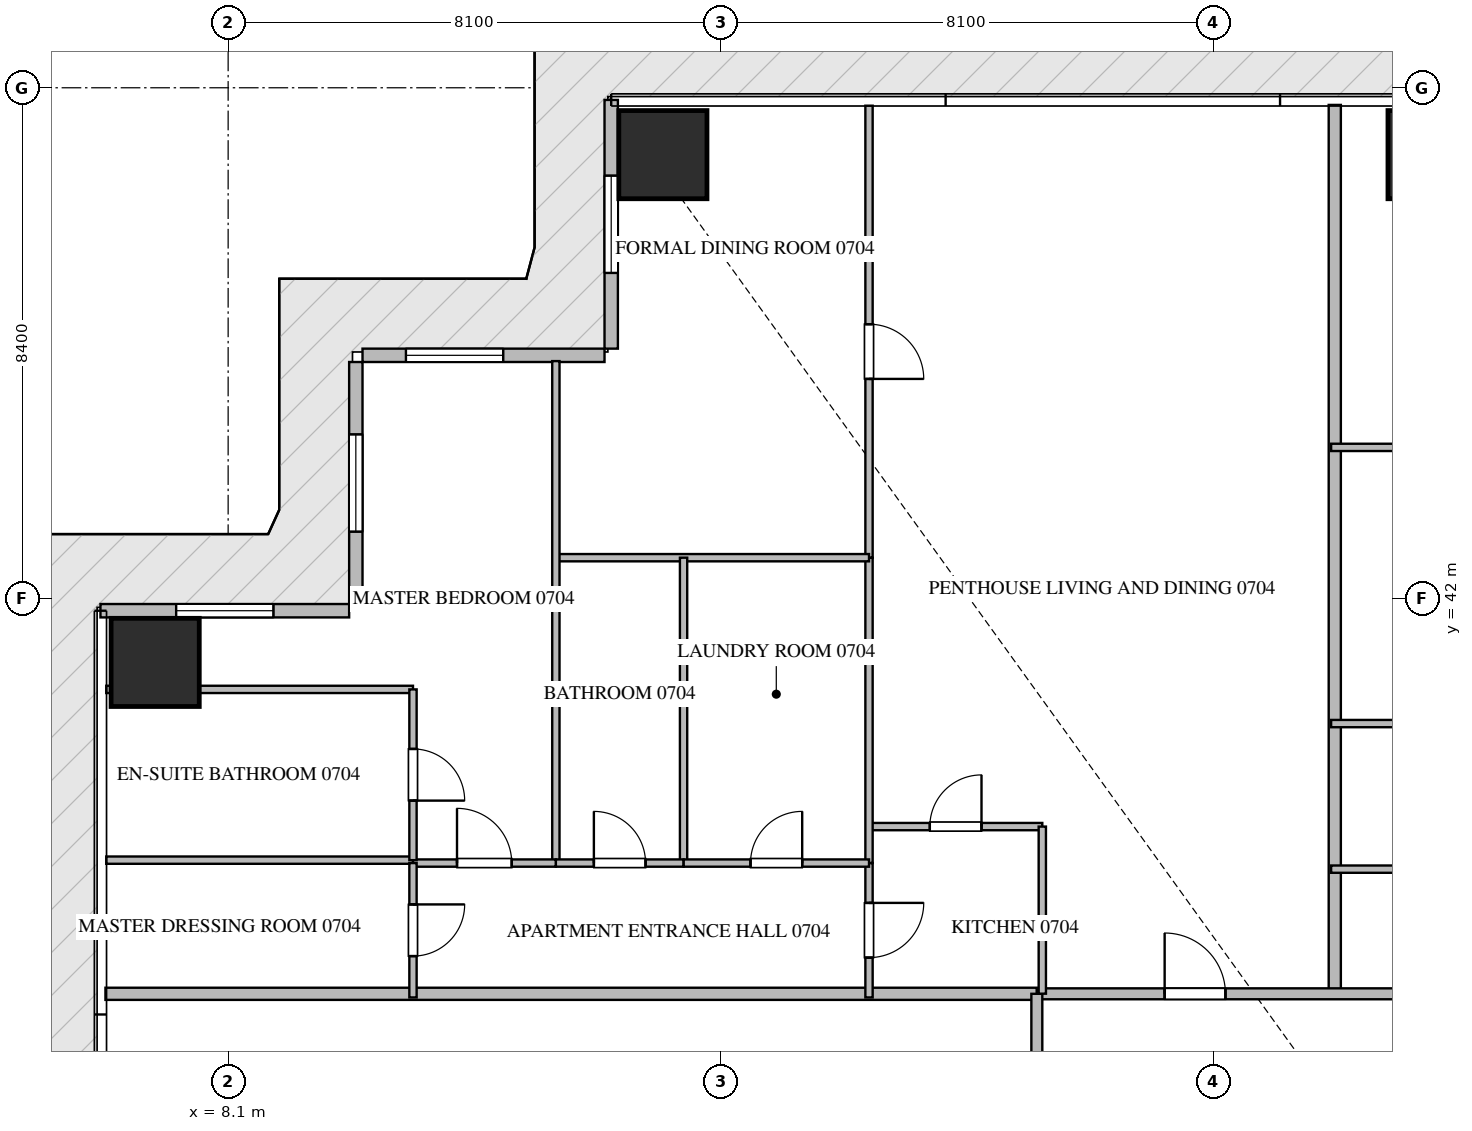
"""IFC4 building model, lengths in metres.
Left out: names, types, materials, properties, quantities, classifications, styles, units other than length and angle.
Written with IfcOpenShell. Run it as: python <this file> out.ifc"""

import sys

from ifc_helpers import new_model, si_unit, direction, frame, frame_2d, origin, origin_2d, place, context, subcontext, project, spatial, rectangle, extrude, source, transform, mapped, element, fill, save


model = new_model("IFC4")
c1 = context("Model", 3, precision=1e-05, world=origin(), true_north=direction((0.0, 1.0)))
c2 = subcontext(c1, "Body", "Model", "MODEL_VIEW")
j1 = project(units=[si_unit("LENGTHUNIT", "METRE"), si_unit("PLANEANGLEUNIT", "RADIAN")], contexts=[c1])
p1 = place(None, origin())
s1 = spatial("IfcSite", under=j1, at=p1, CompositionType="ELEMENT")
p2 = place(p1, origin())
s2 = spatial("IfcBuilding", under=s1, at=p2, CompositionType="ELEMENT")
p3 = place(p2, frame((0.0, 0.0, 34.2)))
s3 = spatial("IfcBuildingStorey", under=s2, at=p3, CompositionType="ELEMENT", Elevation=34.2)
m1 = source(origin(), c2, "Body", "SweptSolid", [
    extrude(rectangle(XDim=1.45, YDim=1.45, at=origin_2d()), origin(), (0.0, 0.0, 1.0), 3.75),
])
for number, where, z_axis, x_axis in (
    (1, (15.25, 49.3, -0.26), (0.0, 0.0, 1.0), (1.0, 0.0, 0.0)),
    (2, (27.9, 49.3, -0.26), (0.0, 0.0, 1.0), (1.0, 0.0, 0.0)),
    (3, (6.9, 40.95, -0.26), (0.0, 0.0, 1.0), (1.0, 0.0, 0.0)),
):
    element("IfcColumn", number, at=place(p3, frame(where, z_axis=z_axis, x_axis=x_axis)), inside=s3, PredefinedType="COLUMN", context=c2, shape_type="MappedRepresentation", body=[
        mapped(m1, transform((0.0, 0.0, 0.0), scale=1.0)),
    ])
p4 = place(p3, frame((14.4, 50.2, 0.0), z_axis=(0.0, 0.0, 1.0), x_axis=(0.0, -1.0, 0.0)))
e4 = element("IfcWall", 4, at=p4, inside=s3, PredefinedType="ELEMENTEDWALL", context=c2, shape_type="SweptSolid", body=[
    extrude(rectangle(XDim=4.09, YDim=0.22, at=frame_2d((2.045, 0.0))), origin(), (0.0, 0.0, 1.0), 3.475),
])
p5 = place(p4, frame((1.245, 0.0, 0.65)))
e5 = element("IfcOpeningElement", 5, at=p5, cuts=e4, PredefinedType="OPENING", context=c2, shape_type="SweptSolid", body=[
    extrude(rectangle(XDim=1.6, YDim=2.1, at=frame_2d((0.8, 1.05))), frame((0.0, 0.12, 0.0), z_axis=(0.0, -1.0, 0.0), x_axis=(1.0, 0.0, 0.0)), (0.0, 0.0, 1.0), 0.24),
])
p6 = place(p3, frame((14.29, 46.0, 0.0), z_axis=(0.0, 0.0, 1.0), x_axis=(-1.0, 0.0, 0.0)))
e6 = element("IfcWall", 6, at=p6, inside=s3, PredefinedType="ELEMENTEDWALL", context=c2, shape_type="SweptSolid", body=[
    extrude(rectangle(XDim=3.98, YDim=0.22, at=frame_2d((1.99, 0.0))), origin(), (0.0, 0.0, 1.0), 3.475),
])
p7 = place(p6, frame((1.666, 0.0, 0.65)))
e7 = element("IfcOpeningElement", 7, at=p7, cuts=e6, PredefinedType="OPENING", context=c2, shape_type="SweptSolid", body=[
    extrude(rectangle(XDim=1.6, YDim=2.1, at=frame_2d((0.8, 1.05))), frame((0.0, 0.12, 0.0), z_axis=(0.0, -1.0, 0.0), x_axis=(1.0, 0.0, 0.0)), (0.0, 0.0, 1.0), 0.24),
])
p8 = place(p3, frame((10.2, 45.89, 0.0), z_axis=(0.0, 0.0, 1.0), x_axis=(0.0, -1.0, 0.0)))
e8 = element("IfcWall", 8, at=p8, inside=s3, PredefinedType="ELEMENTEDWALL", context=c2, shape_type="SweptSolid", body=[
    extrude(rectangle(XDim=3.98, YDim=0.22, at=frame_2d((1.99, 0.0))), origin(), (0.0, 0.0, 1.0), 3.475),
])
p9 = place(p8, frame((1.19, 0.0, 0.65)))
e9 = element("IfcOpeningElement", 9, at=p9, cuts=e8, PredefinedType="OPENING", context=c2, shape_type="SweptSolid", body=[
    extrude(rectangle(XDim=1.6, YDim=2.1, at=frame_2d((0.8, 1.05))), frame((0.0, 0.12, 0.0), z_axis=(0.0, -1.0, 0.0), x_axis=(1.0, 0.0, 0.0)), (0.0, 0.0, 1.0), 0.24),
])
p10 = place(p3, frame((10.09, 41.8, 0.0), z_axis=(0.0, 0.0, 1.0), x_axis=(-1.0, 0.0, 0.0)))
e10 = element("IfcWall", 10, at=p10, inside=s3, PredefinedType="ELEMENTEDWALL", context=c2, shape_type="SweptSolid", body=[
    extrude(rectangle(XDim=4.09, YDim=0.22, at=frame_2d((2.045, 0.0))), origin(), (0.0, 0.0, 1.0), 3.475),
])
p11 = place(p10, frame((1.245, 0.0, 0.65)))
e11 = element("IfcOpeningElement", 11, at=p11, cuts=e10, PredefinedType="OPENING", context=c2, shape_type="SweptSolid", body=[
    extrude(rectangle(XDim=1.6, YDim=2.1, at=frame_2d((0.8, 1.05))), frame((0.0, 0.12, 0.0), z_axis=(0.0, -1.0, 0.0), x_axis=(1.0, 0.0, 0.0)), (0.0, 0.0, 1.0), 0.24),
])
p12 = place(p3, frame((26.3, 35.5, 0.0), z_axis=(0.0, 0.0, 1.0), x_axis=(0.0, 1.0, 0.0)))
e12 = element("IfcWall", 12, at=p12, inside=s3, PredefinedType="PARTITIONING", context=c2, shape_type="SweptSolid", body=[
    extrude(rectangle(XDim=14.618, YDim=0.2, at=frame_2d((7.309, 0.0))), origin(), (0.0, 0.0, 1.0), 3.49),
])
p13 = place(p3, frame((6.082, 35.5, 0.0), z_axis=(0.0, 0.0, 1.0), x_axis=(1.0, 0.0, 0.0)))
e13 = element("IfcWall", 13, at=p13, inside=s3, PredefinedType="PARTITIONING", context=c2, shape_type="SweptSolid", body=[
    extrude(rectangle(XDim=15.318, YDim=0.2, at=frame_2d((7.659, 0.0))), origin(), (0.0, 0.0, 1.0), 3.49),
])
p14 = place(p3, frame((21.402, 35.5, 0.0), z_axis=(0.0, 0.0, 1.0), x_axis=(1.0, 0.0, 0.0)))
e14 = element("IfcWall", 14, at=p14, inside=s3, PredefinedType="PARTITIONING", context=c2, shape_type="SweptSolid", body=[
    extrude(rectangle(XDim=21.996, YDim=0.18, at=frame_2d((10.998, 0.0))), origin(), (0.0, 0.0, 1.0), 3.49),
])
p15 = place(p14, frame((2.1, 0.0, 0.0)))
e15 = element("IfcOpeningElement", 15, at=p15, cuts=e14, PredefinedType="OPENING", context=c2, shape_type="SweptSolid", body=[
    extrude(rectangle(XDim=1.0, YDim=2.15, at=frame_2d((0.5, 1.075))), frame((0.0, 0.1, 0.0), z_axis=(0.0, -1.0, 0.0), x_axis=(1.0, 0.0, 0.0)), (0.0, 0.0, 1.0), 0.2),
])
p16 = place(p14, frame((14.277, 0.0, 0.0)))
e16 = element("IfcOpeningElement", 16, at=p16, cuts=e14, PredefinedType="OPENING", context=c2, shape_type="SweptSolid", body=[
    extrude(rectangle(XDim=1.0, YDim=2.15, at=frame_2d((0.5, 1.075))), frame((0.0, 0.1, 0.0), z_axis=(0.0, -1.0, 0.0), x_axis=(1.0, 0.0, 0.0)), (0.0, 0.0, 1.0), 0.2),
])
p17 = place(p14, frame((18.896, 0.0, 0.0)))
e17 = element("IfcOpeningElement", 17, at=p17, cuts=e14, PredefinedType="OPENING", context=c2, shape_type="SweptSolid", body=[
    extrude(rectangle(XDim=1.0, YDim=2.15, at=frame_2d((0.5, 1.075))), frame((0.0, 0.1, 0.0), z_axis=(0.0, -1.0, 0.0), x_axis=(1.0, 0.0, 0.0)), (0.0, 0.0, 1.0), 0.2),
])
p18 = place(p3, frame((21.4, 14.9, 0.0), z_axis=(0.0, 0.0, 1.0), x_axis=(0.0, 1.0, 0.0)))
e18 = element("IfcWall", 18, at=p18, inside=s3, PredefinedType="PARTITIONING", context=c2, shape_type="SweptSolid", body=[
    extrude(rectangle(XDim=20.6, YDim=0.18, at=frame_2d((10.3, 0.0))), origin(), (0.0, 0.0, 1.0), 3.49),
])
p19 = place(p18, frame((17.64, 0.0, 0.0)))
e19 = element("IfcOpeningElement", 19, at=p19, cuts=e18, PredefinedType="OPENING", context=c2, shape_type="SweptSolid", body=[
    extrude(rectangle(XDim=1.0, YDim=2.15, at=frame_2d((0.5, 1.075))), frame((0.0, 0.1, 0.0), z_axis=(0.0, -1.0, 0.0), x_axis=(1.0, 0.0, 0.0)), (0.0, 0.0, 1.0), 0.2),
])
p20 = place(p3, frame((18.64, 38.25, 0.0), z_axis=(0.0, 0.0, 1.0), x_axis=(1.0, 0.0, 0.0)))
e20 = element("IfcWall", 20, at=p20, inside=s3, PredefinedType="PARTITIONING", context=c2, shape_type="SweptSolid", body=[
    extrude(rectangle(XDim=2.85, YDim=0.12, at=frame_2d((1.425, 0.0))), origin(), (0.0, 0.0, 1.0), 3.49),
])
p21 = place(p20, frame((1.0, 0.0, 0.0)))
e21 = element("IfcOpeningElement", 21, at=p21, cuts=e20, PredefinedType="OPENING", context=c2, shape_type="SweptSolid", body=[
    extrude(rectangle(XDim=0.85, YDim=2.1, at=frame_2d((0.425, 1.05))), frame((0.0, 0.07, 0.0), z_axis=(0.0, -1.0, 0.0), x_axis=(1.0, 0.0, 0.0)), (0.0, 0.0, 1.0), 0.14),
])
p22 = place(p3, frame((21.49, 38.25, 0.0), z_axis=(0.0, 0.0, 1.0), x_axis=(0.0, -1.0, 0.0)))
e22 = element("IfcWall", 22, at=p22, inside=s3, PredefinedType="PARTITIONING", context=c2, shape_type="SweptSolid", body=[
    extrude(rectangle(XDim=2.748, YDim=0.12, at=frame_2d((1.374, 0.0))), origin(), (0.0, 0.0, 1.0), 3.49),
])
p23 = place(p3, frame((18.64, 37.65, 0.0), z_axis=(0.0, 0.0, 1.0), x_axis=(0.0, -1.0, 0.0)))
e23 = element("IfcWall", 23, at=p23, inside=s3, PredefinedType="PARTITIONING", context=c2, shape_type="SweptSolid", body=[
    extrude(rectangle(XDim=2.21, YDim=0.12, at=frame_2d((1.105, 0.0))), origin(), (0.0, 0.0, 1.0), 3.49),
])
p24 = place(p23, frame((0.655, 0.0, 0.0)))
e24 = element("IfcOpeningElement", 24, at=p24, cuts=e23, PredefinedType="OPENING", context=c2, shape_type="SweptSolid", body=[
    extrude(rectangle(XDim=0.9, YDim=2.1, at=frame_2d((0.45, 1.05))), frame((0.0, 0.07, 0.0), z_axis=(0.0, -1.0, 0.0), x_axis=(1.0, 0.0, 0.0)), (0.0, 0.0, 1.0), 0.14),
])
p25 = place(p3, frame((18.64, 50.105, 0.0), z_axis=(0.0, 0.0, 1.0), x_axis=(0.0, -1.0, 0.0)))
e25 = element("IfcWall", 25, at=p25, inside=s3, PredefinedType="PARTITIONING", context=c2, shape_type="SweptSolid", body=[
    extrude(rectangle(XDim=7.433, YDim=0.12, at=frame_2d((3.716, 0.0))), origin(), (0.0, 0.0, 1.0), 3.49),
])
p26 = place(p25, frame((3.593, 0.0, 0.0)))
e26 = element("IfcOpeningElement", 26, at=p26, cuts=e25, PredefinedType="OPENING", context=c2, shape_type="SweptSolid", body=[
    extrude(rectangle(XDim=0.9, YDim=2.1, at=frame_2d((0.45, 1.05))), frame((0.0, 0.07, 0.0), z_axis=(0.0, -1.0, 0.0), x_axis=(1.0, 0.0, 0.0)), (0.0, 0.0, 1.0), 0.14),
])
p27 = place(p3, frame((18.64, 42.67, 0.0), z_axis=(0.0, 0.0, 1.0), x_axis=(0.0, -1.0, 0.0)))
e27 = element("IfcWall", 27, at=p27, inside=s3, PredefinedType="PARTITIONING", context=c2, shape_type="SweptSolid", body=[
    extrude(rectangle(XDim=5.018, YDim=0.12, at=frame_2d((2.509, 0.0))), origin(), (0.0, 0.0, 1.0), 3.49),
])
p28 = place(p3, frame((13.49, 42.672, 0.0), z_axis=(0.0, 0.0, 1.0), x_axis=(1.0, 0.0, 0.0)))
e28 = element("IfcWall", 28, at=p28, inside=s3, PredefinedType="PARTITIONING", context=c2, shape_type="SweptSolid", body=[
    extrude(rectangle(XDim=5.15, YDim=0.12, at=frame_2d((2.575, 0.0))), origin(), (0.0, 0.0, 1.0), 3.49),
])
p29 = place(p3, frame((13.49, 45.905, 0.0), z_axis=(0.0, 0.0, 1.0), x_axis=(0.0, -1.0, 0.0)))
e29 = element("IfcWall", 29, at=p29, inside=s3, PredefinedType="PARTITIONING", context=c2, shape_type="SweptSolid", body=[
    extrude(rectangle(XDim=8.255, YDim=0.12, at=frame_2d((4.127, 0.0))), origin(), (0.0, 0.0, 1.0), 3.49),
])
p30 = place(p3, frame((15.59, 42.672, 0.0), z_axis=(0.0, 0.0, 1.0), x_axis=(0.0, -1.0, 0.0)))
e30 = element("IfcWall", 30, at=p30, inside=s3, PredefinedType="PARTITIONING", context=c2, shape_type="SweptSolid", body=[
    extrude(rectangle(XDim=5.022, YDim=0.12, at=frame_2d((2.511, 0.0))), origin(), (0.0, 0.0, 1.0), 3.49),
])
p31 = place(p3, frame((13.49, 37.65, 0.0), z_axis=(0.0, 0.0, 1.0), x_axis=(1.0, 0.0, 0.0)))
e31 = element("IfcWall", 31, at=p31, inside=s3, PredefinedType="PARTITIONING", context=c2, shape_type="SweptSolid", body=[
    extrude(rectangle(XDim=2.1, YDim=0.12, at=frame_2d((1.05, 0.0))), origin(), (0.0, 0.0, 1.0), 3.49),
])
p32 = place(p31, frame((0.625, 0.0, 0.0)))
e32 = element("IfcOpeningElement", 32, at=p32, cuts=e31, PredefinedType="OPENING", context=c2, shape_type="SweptSolid", body=[
    extrude(rectangle(XDim=0.85, YDim=2.1, at=frame_2d((0.425, 1.05))), frame((0.0, 0.07, 0.0), z_axis=(0.0, -1.0, 0.0), x_axis=(1.0, 0.0, 0.0)), (0.0, 0.0, 1.0), 0.14),
])
p33 = place(p3, frame((15.592, 37.65, 0.0), z_axis=(0.0, 0.0, 1.0), x_axis=(1.0, 0.0, 0.0)))
e33 = element("IfcWall", 33, at=p33, inside=s3, PredefinedType="PARTITIONING", context=c2, shape_type="SweptSolid", body=[
    extrude(rectangle(XDim=3.048, YDim=0.12, at=frame_2d((1.524, 0.0))), origin(), (0.0, 0.0, 1.0), 3.49),
])
p34 = place(p33, frame((1.099, 0.0, 0.0)))
e34 = element("IfcOpeningElement", 34, at=p34, cuts=e33, PredefinedType="OPENING", context=c2, shape_type="SweptSolid", body=[
    extrude(rectangle(XDim=0.85, YDim=2.1, at=frame_2d((0.425, 1.05))), frame((0.0, 0.07, 0.0), z_axis=(0.0, -1.0, 0.0), x_axis=(1.0, 0.0, 0.0)), (0.0, 0.0, 1.0), 0.14),
])
p35 = place(p3, frame((11.14, 37.65, 0.0), z_axis=(0.0, 0.0, 1.0), x_axis=(1.0, 0.0, 0.0)))
e35 = element("IfcWall", 35, at=p35, inside=s3, PredefinedType="PARTITIONING", context=c2, shape_type="SweptSolid", body=[
    extrude(rectangle(XDim=2.348, YDim=0.12, at=frame_2d((1.174, 0.0))), origin(), (0.0, 0.0, 1.0), 3.49),
])
p36 = place(p35, frame((0.724, 0.0, 0.0)))
e36 = element("IfcOpeningElement", 36, at=p36, cuts=e35, PredefinedType="OPENING", context=c2, shape_type="SweptSolid", body=[
    extrude(rectangle(XDim=0.9, YDim=2.1, at=frame_2d((0.45, 1.05))), frame((0.0, 0.07, 0.0), z_axis=(0.0, -1.0, 0.0), x_axis=(1.0, 0.0, 0.0)), (0.0, 0.0, 1.0), 0.14),
])
p37 = place(p3, frame((6.095, 40.506, 0.0), z_axis=(0.0, 0.0, 1.0), x_axis=(1.0, 0.0, 0.0)))
e37 = element("IfcWall", 37, at=p37, inside=s3, PredefinedType="PARTITIONING", context=c2, shape_type="SweptSolid", body=[
    extrude(rectangle(XDim=5.045, YDim=0.12, at=frame_2d((2.522, 0.0))), origin(), (0.0, 0.0, 1.0), 3.49),
])
p38 = place(p3, frame((6.095, 37.698, 0.0), z_axis=(0.0, 0.0, 1.0), x_axis=(1.0, 0.0, 0.0)))
e38 = element("IfcWall", 38, at=p38, inside=s3, PredefinedType="PARTITIONING", context=c2, shape_type="SweptSolid", body=[
    extrude(rectangle(XDim=5.043, YDim=0.12, at=frame_2d((2.521, 0.0))), origin(), (0.0, 0.0, 1.0), 3.49),
])
p39 = place(p3, frame((11.14, 40.506, 0.0), z_axis=(0.0, 0.0, 1.0), x_axis=(0.0, -1.0, 0.0)))
e39 = element("IfcWall", 39, at=p39, inside=s3, PredefinedType="PARTITIONING", context=c2, shape_type="SweptSolid", body=[
    extrude(rectangle(XDim=2.808, YDim=0.12, at=frame_2d((1.404, 0.0))), origin(), (0.0, 0.0, 1.0), 3.49),
])
p40 = place(p39, frame((0.979, 0.0, 0.0)))
e40 = element("IfcOpeningElement", 40, at=p40, cuts=e39, PredefinedType="OPENING", context=c2, shape_type="SweptSolid", body=[
    extrude(rectangle(XDim=0.85, YDim=2.1, at=frame_2d((0.425, 1.05))), frame((0.0, 0.07, 0.0), z_axis=(0.0, -1.0, 0.0), x_axis=(1.0, 0.0, 0.0)), (0.0, 0.0, 1.0), 0.14),
])
p41 = place(p3, frame((11.14, 37.65, 0.0), z_axis=(0.0, 0.0, 1.0), x_axis=(0.0, -1.0, 0.0)))
e41 = element("IfcWall", 41, at=p41, inside=s3, PredefinedType="PARTITIONING", context=c2, shape_type="SweptSolid", body=[
    extrude(rectangle(XDim=2.21, YDim=0.12, at=frame_2d((1.105, 0.0))), origin(), (0.0, 0.0, 1.0), 3.49),
])
p42 = place(p41, frame((0.68, 0.0, 0.0)))
e42 = element("IfcOpeningElement", 42, at=p42, cuts=e41, PredefinedType="OPENING", context=c2, shape_type="SweptSolid", body=[
    extrude(rectangle(XDim=0.85, YDim=2.1, at=frame_2d((0.425, 1.05))), frame((0.0, 0.07, 0.0), z_axis=(0.0, -1.0, 0.0), x_axis=(1.0, 0.0, 0.0)), (0.0, 0.0, 1.0), 0.14),
])
for number, where, z_axis, x_axis in (
    (43, (26.24, 44.486, 0.0), (0.0, 0.0, 1.0), (1.0, 0.0, 0.0)),
    (44, (26.24, 39.944, 0.0), (0.0, 0.0, 1.0), (1.0, 0.0, 0.0)),
    (45, (26.24, 37.55, 0.0), (0.0, 0.0, 1.0), (1.0, 0.0, 0.0)),
):
    element("IfcWall", number, at=place(p3, frame(where, z_axis=z_axis, x_axis=x_axis)), inside=s3, PredefinedType="PARTITIONING", context=c2, shape_type="SweptSolid", body=[
        extrude(rectangle(XDim=7.62, YDim=0.12, at=frame_2d((3.81, 0.0))), origin(), (0.0, 0.0, 1.0), 3.49),
    ])
m2 = source(origin(), c2, "Body", "SweptSolid", [
    extrude(rectangle(XDim=1.6, YDim=2.1, at=frame_2d((0.8, 1.05))), frame((0.0, 0.03, 0.0), z_axis=(0.0, -1.0, 0.0), x_axis=(1.0, 0.0, 0.0)), (0.0, 0.0, 1.0), 0.06),
])
p43 = place(p5, origin())
e46 = element("IfcWindow", 46, at=p43, inside=s3, PartitioningType="SINGLE_PANEL", PredefinedType="WINDOW", context=c2, shape_type="MappedRepresentation", body=[
    mapped(m2, transform((0.0, 0.0, 0.0), scale=1.0)),
])
fill(e5, e46)
p44 = place(p7, origin())
e47 = element("IfcWindow", 47, at=p44, inside=s3, PartitioningType="SINGLE_PANEL", PredefinedType="WINDOW", context=c2, shape_type="MappedRepresentation", body=[
    mapped(m2, transform((0.0, 0.0, 0.0), scale=1.0)),
])
fill(e7, e47)
p45 = place(p9, origin())
e48 = element("IfcWindow", 48, at=p45, inside=s3, PartitioningType="SINGLE_PANEL", PredefinedType="WINDOW", context=c2, shape_type="MappedRepresentation", body=[
    mapped(m2, transform((0.0, 0.0, 0.0), scale=1.0)),
])
fill(e9, e48)
p46 = place(p11, origin())
e49 = element("IfcWindow", 49, at=p46, inside=s3, PartitioningType="SINGLE_PANEL", PredefinedType="WINDOW", context=c2, shape_type="MappedRepresentation", body=[
    mapped(m2, transform((0.0, 0.0, 0.0), scale=1.0)),
])
fill(e11, e49)
m3 = source(origin(), c2, "Body", "SweptSolid", [
    extrude(rectangle(XDim=1.0, YDim=2.15, at=frame_2d((0.5, 1.075))), frame((0.0, 0.025, 0.0), z_axis=(0.0, -1.0, 0.0), x_axis=(1.0, 0.0, 0.0)), (0.0, 0.0, 1.0), 0.05),
])
p47 = place(p15, origin())
e50 = element("IfcDoor", 50, at=p47, inside=s3, OperationType="SINGLE_SWING_LEFT", PredefinedType="DOOR", context=c2, shape_type="MappedRepresentation", body=[
    mapped(m3, transform((0.0, 0.0, 0.0), scale=1.0)),
])
fill(e15, e50)
m4 = source(origin(), c2, "Body", "SweptSolid", [
    extrude(rectangle(XDim=0.85, YDim=2.1, at=frame_2d((0.425, 1.05))), frame((0.0, 0.025, 0.0), z_axis=(0.0, -1.0, 0.0), x_axis=(1.0, 0.0, 0.0)), (0.0, 0.0, 1.0), 0.05),
])
p48 = place(p21, origin())
e51 = element("IfcDoor", 51, at=p48, inside=s3, OperationType="SINGLE_SWING_RIGHT", PredefinedType="DOOR", context=c2, shape_type="MappedRepresentation", body=[
    mapped(m4, transform((0.0, 0.0, 0.0), scale=1.0)),
])
fill(e21, e51)
m5 = source(origin(), c2, "Body", "SweptSolid", [
    extrude(rectangle(XDim=0.9, YDim=2.1, at=frame_2d((0.45, 1.05))), frame((0.0, 0.025, 0.0), z_axis=(0.0, -1.0, 0.0), x_axis=(1.0, 0.0, 0.0)), (0.0, 0.0, 1.0), 0.05),
])
p49 = place(p24, origin())
e52 = element("IfcDoor", 52, at=p49, inside=s3, OperationType="SINGLE_SWING_LEFT", PredefinedType="DOOR", context=c2, shape_type="MappedRepresentation", body=[
    mapped(m5, transform((0.0, 0.0, 0.0), scale=1.0)),
])
fill(e24, e52)
p50 = place(p26, origin())
e53 = element("IfcDoor", 53, at=p50, inside=s3, OperationType="SINGLE_SWING_RIGHT", PredefinedType="DOOR", context=c2, shape_type="MappedRepresentation", body=[
    mapped(m5, transform((0.0, 0.0, 0.0), scale=1.0)),
])
fill(e26, e53)
p51 = place(p32, origin())
e54 = element("IfcDoor", 54, at=p51, inside=s3, OperationType="SINGLE_SWING_LEFT", PredefinedType="DOOR", context=c2, shape_type="MappedRepresentation", body=[
    mapped(m4, transform((0.0, 0.0, 0.0), scale=1.0)),
])
fill(e32, e54)
p52 = place(p34, origin())
e55 = element("IfcDoor", 55, at=p52, inside=s3, OperationType="SINGLE_SWING_RIGHT", PredefinedType="DOOR", context=c2, shape_type="MappedRepresentation", body=[
    mapped(m4, transform((0.0, 0.0, 0.0), scale=1.0)),
])
fill(e34, e55)
p53 = place(p36, origin())
e56 = element("IfcDoor", 56, at=p53, inside=s3, OperationType="SINGLE_SWING_LEFT", PredefinedType="DOOR", context=c2, shape_type="MappedRepresentation", body=[
    mapped(m5, transform((0.0, 0.0, 0.0), scale=1.0)),
])
fill(e36, e56)
p54 = place(p40, origin())
e57 = element("IfcDoor", 57, at=p54, inside=s3, OperationType="SINGLE_SWING_RIGHT", PredefinedType="DOOR", context=c2, shape_type="MappedRepresentation", body=[
    mapped(m4, transform((0.0, 0.0, 0.0), scale=1.0)),
])
fill(e40, e57)
p55 = place(p42, origin())
e58 = element("IfcDoor", 58, at=p55, inside=s3, OperationType="SINGLE_SWING_LEFT", PredefinedType="DOOR", context=c2, shape_type="MappedRepresentation", body=[
    mapped(m4, transform((0.0, 0.0, 0.0), scale=1.0)),
])
fill(e42, e58)
save(model, sys.argv[1])
